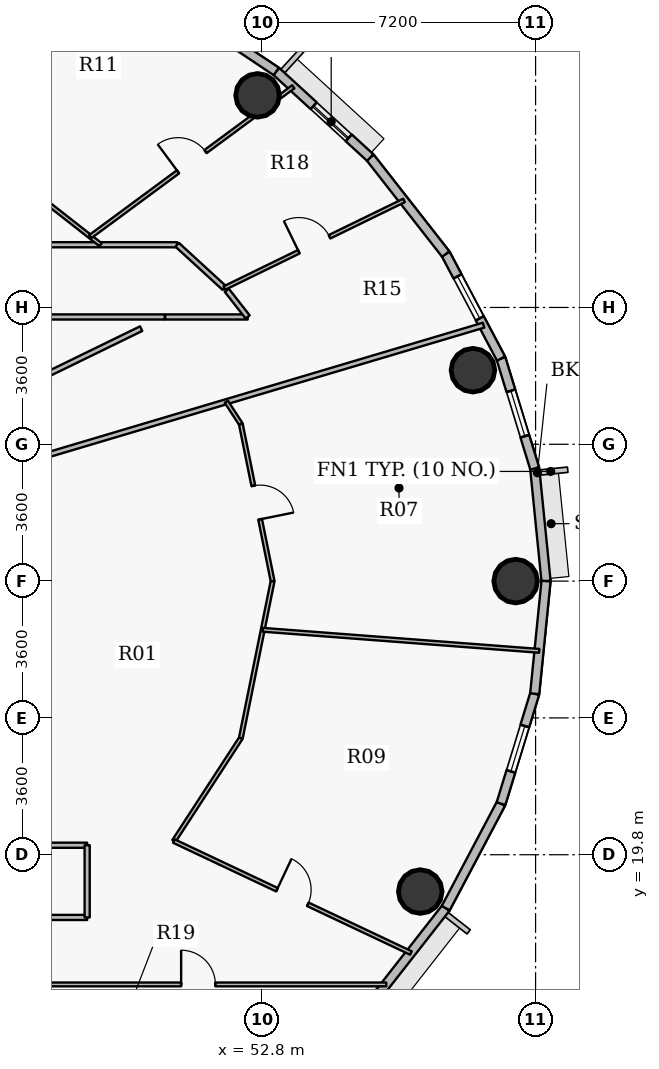
"""IFC4 building model, lengths in metres.
Left out: names, types, materials, properties, quantities, classifications, styles, units other than length and angle.
Written with IfcOpenShell. Run it as: python <this file> out.ifc"""

import sys

from ifc_helpers import new_model, si_unit, direction, frame, frame_2d, origin, origin_2d, place, context, subcontext, project, spatial, rectangle, hollow_circle, extrude, source, transform, mapped, element, fill, save


model = new_model("IFC4")
c1 = context("Model", 3, precision=1e-05, world=origin(), true_north=direction((0.0, 1.0)))
c2 = subcontext(c1, "Body", "Model", "MODEL_VIEW")
j1 = project(units=[si_unit("LENGTHUNIT", "METRE"), si_unit("PLANEANGLEUNIT", "RADIAN")], contexts=[c1])
p1 = place(None, origin())
s1 = spatial("IfcSite", under=j1, at=p1, CompositionType="ELEMENT")
p2 = place(p1, origin())
s2 = spatial("IfcBuilding", under=s1, at=p2, CompositionType="ELEMENT")
p3 = place(p2, frame((0.0, 0.0, 240.3)))
s3 = spatial("IfcBuildingStorey", under=s2, at=p3, CompositionType="ELEMENT", Elevation=240.3)
for number, where, z_axis, x_axis in (
    (1, (59.475, 27.0, 0.0), (0.0, 0.0, 1.0), (1.0, 0.0, 0.0)),
    (2, (58.351, 32.549, 0.0), (0.0, 0.0, 1.0), (1.0, 0.0, 0.0)),
    (3, (52.683, 39.781, 0.0), (0.0, 0.0, 1.0), (1.0, 0.0, 0.0)),
    (4, (56.965, 18.831, 0.0), (0.0, 0.0, 1.0), (1.0, 0.0, 0.0)),
):
    element("IfcColumn", number, at=place(p3, frame(where, z_axis=z_axis, x_axis=x_axis)), inside=s3, PredefinedType="COLUMN", context=c2, shape_type="SweptSolid", body=[
        extrude(hollow_circle(Radius=0.575, WallThickness=0.036, at=origin_2d()), origin(), (0.0, 0.0, 1.0), 3.75),
    ])
p4 = place(p3, frame((59.977, 29.964, 0.0), z_axis=(0.0, 0.0, 1.0), x_axis=(0.099990595253, -0.994988382274, 0.0)))
e5 = element("IfcWall", 5, at=p4, inside=s3, PredefinedType="SOLIDWALL", context=c2, shape_type="SweptSolid", body=[
    extrude(rectangle(XDim=2.979, YDim=0.24, at=frame_2d((1.489, 0.0))), origin(), (0.0, 0.0, 1.0), 3.5),
])
p5 = place(p3, frame((59.09, 32.856, 0.0), z_axis=(0.0, 0.0, 1.0), x_axis=(0.293132907334, -0.95607170162, 0.0)))
e6 = element("IfcWall", 6, at=p5, inside=s3, PredefinedType="SOLIDWALL", context=c2, shape_type="SweptSolid", body=[
    extrude(rectangle(XDim=3.025, YDim=0.24, at=frame_2d((1.512, 0.0))), origin(), (0.0, 0.0, 1.0), 3.5),
])
p6 = place(p5, frame((0.887, 0.0, 0.9)))
e7 = element("IfcOpeningElement", 7, at=p6, cuts=e6, PredefinedType="OPENING", context=c2, shape_type="SweptSolid", body=[
    extrude(rectangle(XDim=1.25, YDim=1.65, at=origin_2d()), frame((0.625, 0.13, 0.825), z_axis=(0.0, -1.0, 0.0), x_axis=(1.0, 0.0, 0.0)), (0.0, 0.0, 1.0), 0.26),
])
p7 = place(p3, frame((57.636, 35.605, 0.0), z_axis=(0.0, 0.0, 1.0), x_axis=(0.46766049993, -0.883908172157, 0.0)))
e8 = element("IfcWall", 8, at=p7, inside=s3, PredefinedType="SOLIDWALL", context=c2, shape_type="SweptSolid", body=[
    extrude(rectangle(XDim=3.11, YDim=0.24, at=frame_2d((1.555, 0.0))), origin(), (0.0, 0.0, 1.0), 3.5),
])
p8 = place(p7, frame((0.664, 0.0, 0.9)))
e9 = element("IfcOpeningElement", 9, at=p8, cuts=e8, PredefinedType="OPENING", context=c2, shape_type="SweptSolid", body=[
    extrude(rectangle(XDim=1.25, YDim=1.65, at=origin_2d()), frame((0.625, 0.13, 0.825), z_axis=(0.0, -1.0, 0.0), x_axis=(1.0, 0.0, 0.0)), (0.0, 0.0, 1.0), 0.26),
])
p9 = place(p3, frame((55.648, 38.145, 0.0), z_axis=(0.0, 0.0, 1.0), x_axis=(0.616312344705, -0.787501805562, 0.0)))
e10 = element("IfcWall", 10, at=p9, inside=s3, PredefinedType="SOLIDWALL", context=c2, shape_type="SweptSolid", body=[
    extrude(rectangle(XDim=3.225, YDim=0.24, at=frame_2d((1.612, 0.0))), origin(), (0.0, 0.0, 1.0), 3.5),
])
p10 = place(p3, frame((53.176, 40.411, 0.0), z_axis=(0.0, 0.0, 1.0), x_axis=(0.737123922599, -0.675757591694, 0.0)))
e11 = element("IfcWall", 11, at=p10, inside=s3, PredefinedType="SOLIDWALL", context=c2, shape_type="SweptSolid", body=[
    extrude(rectangle(XDim=3.354, YDim=0.24, at=frame_2d((1.677, 0.0))), origin(), (0.0, 0.0, 1.0), 3.5),
])
p11 = place(p10, frame((1.336, 0.0, 0.9)))
e12 = element("IfcOpeningElement", 12, at=p11, cuts=e11, PredefinedType="OPENING", context=c2, shape_type="SweptSolid", body=[
    extrude(rectangle(XDim=1.25, YDim=1.65, at=origin_2d()), frame((0.625, 0.13, 0.825), z_axis=(0.0, -1.0, 0.0), x_axis=(1.0, 0.0, 0.0)), (0.0, 0.0, 1.0), 0.26),
])
p12 = place(p3, frame((50.28, 42.348, 0.0), z_axis=(0.0, 0.0, 1.0), x_axis=(0.831262496074, -0.555880079352, 0.0)))
e13 = element("IfcWall", 13, at=p12, inside=s3, PredefinedType="SOLIDWALL", context=c2, shape_type="SweptSolid", body=[
    extrude(rectangle(XDim=3.484, YDim=0.24, at=frame_2d((1.742, 0.0))), origin(), (0.0, 0.0, 1.0), 3.5),
])
p13 = place(p3, frame((57.636, 18.395, 0.0), z_axis=(0.0, 0.0, 1.0), x_axis=(-0.616312344705, -0.787501805562, 0.0)))
e14 = element("IfcWall", 14, at=p13, inside=s3, PredefinedType="SOLIDWALL", context=c2, shape_type="SweptSolid", body=[
    extrude(rectangle(XDim=3.225, YDim=0.24, at=frame_2d((1.612, 0.0))), origin(), (0.0, 0.0, 1.0), 3.5),
])
p14 = place(p3, frame((59.09, 21.144, 0.0), z_axis=(0.0, 0.0, 1.0), x_axis=(-0.46766049993, -0.883908172157, 0.0)))
e15 = element("IfcWall", 15, at=p14, inside=s3, PredefinedType="SOLIDWALL", context=c2, shape_type="SweptSolid", body=[
    extrude(rectangle(XDim=3.11, YDim=0.24, at=frame_2d((1.555, 0.0))), origin(), (0.0, 0.0, 1.0), 3.5),
])
p15 = place(p3, frame((59.977, 24.036, 0.0), z_axis=(0.0, 0.0, 1.0), x_axis=(-0.293132907334, -0.95607170162, 0.0)))
e16 = element("IfcWall", 16, at=p15, inside=s3, PredefinedType="SOLIDWALL", context=c2, shape_type="SweptSolid", body=[
    extrude(rectangle(XDim=3.025, YDim=0.24, at=frame_2d((1.512, 0.0))), origin(), (0.0, 0.0, 1.0), 3.5),
])
p16 = place(p15, frame((0.887, 0.0, 0.9)))
e17 = element("IfcOpeningElement", 17, at=p16, cuts=e16, PredefinedType="OPENING", context=c2, shape_type="SweptSolid", body=[
    extrude(rectangle(XDim=1.25, YDim=1.65, at=origin_2d()), frame((0.625, 0.13, 0.825), z_axis=(0.0, -1.0, 0.0), x_axis=(1.0, 0.0, 0.0)), (0.0, 0.0, 1.0), 0.26),
])
p17 = place(p3, frame((60.275, 27.0, 0.0), z_axis=(0.0, 0.0, 1.0), x_axis=(-0.099990595253, -0.994988382274, 0.0)))
e18 = element("IfcWall", 18, at=p17, inside=s3, PredefinedType="SOLIDWALL", context=c2, shape_type="SweptSolid", body=[
    extrude(rectangle(XDim=2.979, YDim=0.24, at=frame_2d((1.489, 0.0))), origin(), (0.0, 0.0, 1.0), 3.5),
])
p18 = place(p3, frame((24.35, 18.15, 0.0), z_axis=(0.0, 0.0, 1.0), x_axis=(1.0, 0.0, 0.0)))
e19 = element("IfcWall", 19, at=p18, inside=s3, PredefinedType="PARTITIONING", context=c2, shape_type="SweptSolid", body=[
    extrude(rectangle(XDim=23.85, YDim=0.135, at=frame_2d((11.925, 0.0))), origin(), (0.0, 0.0, 1.0), 2.935),
])
p19 = place(p18, frame((14.838, 0.0, 0.0)))
e20 = element("IfcOpeningElement", 20, at=p19, cuts=e19, PredefinedType="OPENING", context=c2, shape_type="SweptSolid", body=[
    extrude(rectangle(XDim=1.0, YDim=2.15, at=origin_2d()), frame((0.5, 0.078, 1.075), z_axis=(0.0, -1.0, 0.0), x_axis=(1.0, 0.0, 0.0)), (0.0, 0.0, 1.0), 0.155),
])
p20 = place(p18, frame((21.472, 0.0, 0.0)))
e21 = element("IfcOpeningElement", 21, at=p20, cuts=e19, PredefinedType="OPENING", context=c2, shape_type="SweptSolid", body=[
    extrude(rectangle(XDim=1.0, YDim=2.15, at=origin_2d()), frame((0.5, 0.078, 1.075), z_axis=(0.0, -1.0, 0.0), x_axis=(1.0, 0.0, 0.0)), (0.0, 0.0, 1.0), 0.155),
])
p21 = place(p3, frame((24.35, 35.85, 0.0), z_axis=(0.0, 0.0, 1.0), x_axis=(1.0, 0.0, 0.0)))
e22 = element("IfcWall", 22, at=p21, inside=s3, PredefinedType="PARTITIONING", context=c2, shape_type="SweptSolid", body=[
    extrude(rectangle(XDim=26.218, YDim=0.135, at=frame_2d((13.109, 0.0))), origin(), (0.0, 0.0, 1.0), 2.935),
])
p22 = place(p21, frame((3.172, 0.0, 0.0)))
e23 = element("IfcOpeningElement", 23, at=p22, cuts=e22, PredefinedType="OPENING", context=c2, shape_type="SweptSolid", body=[
    extrude(rectangle(XDim=1.0, YDim=2.15, at=origin_2d()), frame((0.5, 0.078, 1.075), z_axis=(0.0, -1.0, 0.0), x_axis=(1.0, 0.0, 0.0)), (0.0, 0.0, 1.0), 0.155),
])
p23 = place(p21, frame((18.306, 0.0, 0.0)))
e24 = element("IfcOpeningElement", 24, at=p23, cuts=e22, PredefinedType="OPENING", context=c2, shape_type="SweptSolid", body=[
    extrude(rectangle(XDim=1.0, YDim=2.15, at=origin_2d()), frame((0.5, 0.078, 1.075), z_axis=(0.0, -1.0, 0.0), x_axis=(1.0, 0.0, 0.0)), (0.0, 0.0, 1.0), 0.155),
])
p24 = place(p3, frame((45.8, 20.05, 0.0), z_axis=(0.0, 0.0, 1.0), x_axis=(1.0, 0.0, 0.0)))
e25 = element("IfcWall", 25, at=p24, inside=s3, PredefinedType="PARTITIONING", context=c2, shape_type="SweptSolid", body=[
    extrude(rectangle(XDim=2.4, YDim=0.135, at=frame_2d((1.2, 0.0))), origin(), (0.0, 0.0, 1.0), 3.5),
])
p25 = place(p3, frame((45.97, 29.967, 0.0), z_axis=(0.0, 0.0, 1.0), x_axis=(0.958474934199, 0.285176788174, 0.0)))
e26 = element("IfcWall", 26, at=p25, inside=s3, PredefinedType="PARTITIONING", context=c2, shape_type="SweptSolid", body=[
    extrude(rectangle(XDim=13.21, YDim=0.135, at=frame_2d((6.605, 0.0))), origin(), (0.0, 0.0, 1.0), 2.985),
])
p26 = place(p3, frame((46.039, 37.819, 0.0), z_axis=(0.0, 0.0, 1.0), x_axis=(0.787364681479, -0.616487516791, 0.0)))
e27 = element("IfcWall", 27, at=p26, inside=s3, PredefinedType="PARTITIONING", context=c2, shape_type="SweptSolid", body=[
    extrude(rectangle(XDim=3.195, YDim=0.1, at=frame_2d((1.597, 0.0))), origin(), (0.0, 0.0, 1.0), 2.935),
])
p27 = place(p3, frame((46.175, 16.387, 0.0), z_axis=(0.0, 0.0, 1.0), x_axis=(1.0, 0.0, 0.0)))
e28 = element("IfcWall", 28, at=p27, inside=s3, PredefinedType="PARTITIONING", context=c2, shape_type="SweptSolid", body=[
    extrude(rectangle(XDim=9.896, YDim=0.1, at=frame_2d((4.948, 0.0))), origin(), (0.0, 0.0, 1.0), 2.935),
])
p28 = place(p27, frame((4.498, 0.0, 0.0)))
e29 = element("IfcOpeningElement", 29, at=p28, cuts=e28, PredefinedType="OPENING", context=c2, shape_type="SweptSolid", body=[
    extrude(rectangle(XDim=0.9, YDim=2.1, at=origin_2d()), frame((0.45, 0.06, 1.05), z_axis=(0.0, -1.0, 0.0), x_axis=(1.0, 0.0, 0.0)), (0.0, 0.0, 1.0), 0.12),
])
p29 = place(p3, frame((46.23, 16.33, 0.0), z_axis=(0.0, 0.0, 1.0), x_axis=(0.69206255942, -0.721837525935, 0.0)))
e30 = element("IfcWall", 30, at=p29, inside=s3, PredefinedType="PARTITIONING", context=c2, shape_type="SweptSolid", body=[
    extrude(rectangle(XDim=6.24, YDim=0.135, at=frame_2d((3.12, 0.0))), origin(), (0.0, 0.0, 1.0), 2.985),
])
p30 = place(p3, frame((48.2, 18.15, 0.0), z_axis=(0.0, 0.0, 1.0), x_axis=(0.0, 1.0, 0.0)))
e31 = element("IfcWall", 31, at=p30, inside=s3, PredefinedType="PARTITIONING", context=c2, shape_type="SweptSolid", body=[
    extrude(rectangle(XDim=1.9, YDim=0.135, at=frame_2d((0.95, 0.0))), origin(), (0.0, 0.0, 1.0), 3.5),
])
p31 = place(p3, frame((48.281, 36.064, 0.0), z_axis=(0.0, 0.0, 1.0), x_axis=(0.804612975085, 0.593799596097, 0.0)))
e32 = element("IfcWall", 32, at=p31, inside=s3, PredefinedType="PARTITIONING", context=c2, shape_type="SweptSolid", body=[
    extrude(rectangle(XDim=6.64, YDim=0.1, at=frame_2d((3.32, 0.0))), origin(), (0.0, 0.0, 1.0), 2.985),
])
p32 = place(p31, frame((2.87, 0.0, 0.0)))
e33 = element("IfcOpeningElement", 33, at=p32, cuts=e32, PredefinedType="OPENING", context=c2, shape_type="SweptSolid", body=[
    extrude(rectangle(XDim=0.9, YDim=2.1, at=origin_2d()), frame((0.45, 0.06, 1.05), z_axis=(0.0, -1.0, 0.0), x_axis=(1.0, 0.0, 0.0)), (0.0, 0.0, 1.0), 0.12),
])
p33 = place(p3, frame((50.251, 33.95, 0.0), z_axis=(0.0, 0.0, 1.0), x_axis=(1.0, 0.0, 0.0)))
e34 = element("IfcWall", 34, at=p33, inside=s3, PredefinedType="PARTITIONING", context=c2, shape_type="SweptSolid", body=[
    extrude(rectangle(XDim=2.172, YDim=0.135, at=frame_2d((1.086, 0.0))), origin(), (0.0, 0.0, 1.0), 3.5),
])
p34 = place(p3, frame((50.482, 20.16, 0.0), z_axis=(0.0, 0.0, 1.0), x_axis=(0.545421330779, 0.838162020096, 0.0)))
e35 = element("IfcWall", 35, at=p34, inside=s3, PredefinedType="PARTITIONING", context=c2, shape_type="SweptSolid", body=[
    extrude(rectangle(XDim=3.23, YDim=0.1, at=frame_2d((1.615, 0.0))), origin(), (0.0, 0.0, 1.0), 2.935),
])
p35 = place(p3, frame((50.482, 20.16, 0.0), z_axis=(0.0, 0.0, 1.0), x_axis=(0.904207257568, -0.42709394208, 0.0)))
e36 = element("IfcWall", 36, at=p35, inside=s3, PredefinedType="PARTITIONING", context=c2, shape_type="SweptSolid", body=[
    extrude(rectangle(XDim=6.897, YDim=0.1, at=frame_2d((3.448, 0.0))), origin(), (0.0, 0.0, 1.0), 2.985),
])
p36 = place(p35, frame((2.998, 0.0, 0.0)))
e37 = element("IfcOpeningElement", 37, at=p36, cuts=e36, PredefinedType="OPENING", context=c2, shape_type="SweptSolid", body=[
    extrude(rectangle(XDim=0.9, YDim=2.1, at=origin_2d()), frame((0.45, 0.06, 1.05), z_axis=(0.0, -1.0, 0.0), x_axis=(1.0, 0.0, 0.0)), (0.0, 0.0, 1.0), 0.12),
])
p37 = place(p3, frame((50.568, 35.85, 0.0), z_axis=(0.0, 0.0, 1.0), x_axis=(0.737130103714, -0.675750849202, 0.0)))
e38 = element("IfcWall", 38, at=p37, inside=s3, PredefinedType="PARTITIONING", context=c2, shape_type="SweptSolid", body=[
    extrude(rectangle(XDim=1.687, YDim=0.135, at=frame_2d((0.843, 0.0))), origin(), (0.0, 0.0, 1.0), 3.5),
])
p38 = place(p3, frame((51.811, 34.71, 0.0), z_axis=(0.0, 0.0, 1.0), x_axis=(0.89880279574, 0.438353207322, 0.0)))
e39 = element("IfcWall", 39, at=p38, inside=s3, PredefinedType="PARTITIONING", context=c2, shape_type="SweptSolid", body=[
    extrude(rectangle(XDim=5.259, YDim=0.1, at=frame_2d((2.63, 0.0))), origin(), (0.0, 0.0, 1.0), 2.985),
])
p39 = place(p38, frame((2.18, 0.0, 0.0)))
e40 = element("IfcOpeningElement", 40, at=p39, cuts=e39, PredefinedType="OPENING", context=c2, shape_type="SweptSolid", body=[
    extrude(rectangle(XDim=0.9, YDim=2.1, at=origin_2d()), frame((0.45, 0.06, 1.05), z_axis=(0.0, -1.0, 0.0), x_axis=(1.0, 0.0, 0.0)), (0.0, 0.0, 1.0), 0.12),
])
p40 = place(p3, frame((51.862, 31.719, 0.0), z_axis=(0.0, 0.0, 1.0), x_axis=(0.545576382868, -0.838061101863, 0.0)))
e41 = element("IfcWall", 41, at=p40, inside=s3, PredefinedType="PARTITIONING", context=c2, shape_type="SweptSolid", body=[
    extrude(rectangle(XDim=0.7, YDim=0.1, at=frame_2d((0.35, 0.0))), origin(), (0.0, 0.0, 1.0), 2.935),
])
p41 = place(p3, frame((51.874, 34.653, 0.0), z_axis=(0.0, 0.0, 1.0), x_axis=(0.61628613448, -0.787522317429, 0.0)))
e42 = element("IfcWall", 42, at=p41, inside=s3, PredefinedType="PARTITIONING", context=c2, shape_type="SweptSolid", body=[
    extrude(rectangle(XDim=0.893, YDim=0.135, at=frame_2d((0.446, 0.0))), origin(), (0.0, 0.0, 1.0), 3.5),
])
p42 = place(p3, frame((52.244, 22.867, 0.0), z_axis=(0.0, 0.0, 1.0), x_axis=(0.198276062883, 0.980146215056, 0.0)))
e43 = element("IfcWall", 43, at=p42, inside=s3, PredefinedType="PARTITIONING", context=c2, shape_type="SweptSolid", body=[
    extrude(rectangle(XDim=4.216, YDim=0.1, at=frame_2d((2.108, 0.0))), origin(), (0.0, 0.0, 1.0), 2.935),
])
p43 = place(p3, frame((52.244, 31.133, 0.0), z_axis=(0.0, 0.0, 1.0), x_axis=(0.198264809747, -0.980148491411, 0.0)))
e44 = element("IfcWall", 44, at=p43, inside=s3, PredefinedType="PARTITIONING", context=c2, shape_type="SweptSolid", body=[
    extrude(rectangle(XDim=4.216, YDim=0.1, at=frame_2d((2.108, 0.0))), origin(), (0.0, 0.0, 1.0), 2.935),
])
p44 = place(p43, frame((1.658, 0.0, 0.0)))
e45 = element("IfcOpeningElement", 45, at=p44, cuts=e44, PredefinedType="OPENING", context=c2, shape_type="SweptSolid", body=[
    extrude(rectangle(XDim=0.9, YDim=2.1, at=origin_2d()), frame((0.45, 0.06, 1.05), z_axis=(0.0, -1.0, 0.0), x_axis=(1.0, 0.0, 0.0)), (0.0, 0.0, 1.0), 0.12),
])
p45 = place(p3, frame((52.821, 25.719, 0.0), z_axis=(0.0, 0.0, 1.0), x_axis=(0.997110709209, -0.075962053559, 0.0)))
e46 = element("IfcWall", 46, at=p45, inside=s3, PredefinedType="PARTITIONING", context=c2, shape_type="SweptSolid", body=[
    extrude(rectangle(XDim=7.296, YDim=0.1, at=frame_2d((3.648, 0.0))), origin(), (0.0, 0.0, 1.0), 2.985),
])
p46 = place(p3, frame((50.241, 33.95, 0.0), z_axis=(0.0, 0.0, 1.0), x_axis=(-1.0, 0.0, 0.0)))
e47 = element("IfcWall", 47, at=p46, inside=s3, PredefinedType="PARTITIONING", context=c2, shape_type="SweptSolid", body=[
    extrude(rectangle(XDim=4.441, YDim=0.135, at=frame_2d((2.221, 0.0))), origin(), (0.0, 0.0, 1.0), 3.5),
])
p47 = place(p3, frame((46.06, 31.906, 0.0), z_axis=(0.0, 0.0, 1.0), x_axis=(0.898819963923, 0.438318003797, 0.0)))
e48 = element("IfcWall", 48, at=p47, inside=s3, PredefinedType="PARTITIONING", context=c2, shape_type="SweptSolid", body=[
    extrude(rectangle(XDim=3.962, YDim=0.135, at=frame_2d((1.981, 0.0))), origin(), (0.0, 0.0, 1.0), 3.5),
])
m1 = source(origin(), c2, "Body", "SweptSolid", [
    extrude(rectangle(XDim=1.25, YDim=1.65, at=origin_2d()), frame((0.625, 0.03, 0.825), z_axis=(0.0, -1.0, 0.0), x_axis=(1.0, 0.0, 0.0)), (0.0, 0.0, 1.0), 0.06),
])
p48 = place(p11, origin())
e49 = element("IfcWindow", 49, at=p48, inside=s3, PartitioningType="SINGLE_PANEL", PredefinedType="WINDOW", context=c2, shape_type="MappedRepresentation", body=[
    mapped(m1, transform((0.0, 0.0, 0.0), x_axis=(1.0, 0.0, 0.0), y_axis=(0.0, 1.0, 0.0), z_axis=(0.0, 0.0, 1.0), scale=1.0)),
])
fill(e12, e49)
p49 = place(p16, origin())
e50 = element("IfcWindow", 50, at=p49, inside=s3, PartitioningType="SINGLE_PANEL", PredefinedType="WINDOW", context=c2, shape_type="MappedRepresentation", body=[
    mapped(m1, transform((0.0, 0.0, 0.0), x_axis=(1.0, 0.0, 0.0), y_axis=(0.0, 1.0, 0.0), z_axis=(0.0, 0.0, 1.0), scale=1.0)),
])
fill(e17, e50)
p50 = place(p6, origin())
e51 = element("IfcWindow", 51, at=p50, inside=s3, PartitioningType="SINGLE_PANEL", PredefinedType="WINDOW", context=c2, shape_type="MappedRepresentation", body=[
    mapped(m1, transform((0.0, 0.0, 0.0), x_axis=(1.0, 0.0, 0.0), y_axis=(0.0, 1.0, 0.0), z_axis=(0.0, 0.0, 1.0), scale=1.0)),
])
fill(e7, e51)
p51 = place(p8, origin())
e52 = element("IfcWindow", 52, at=p51, inside=s3, PartitioningType="SINGLE_PANEL", PredefinedType="WINDOW", context=c2, shape_type="MappedRepresentation", body=[
    mapped(m1, transform((0.0, 0.0, 0.0), x_axis=(1.0, 0.0, 0.0), y_axis=(0.0, 1.0, 0.0), z_axis=(0.0, 0.0, 1.0), scale=1.0)),
])
fill(e9, e52)
m2 = source(origin(), c2, "Body", "SweptSolid", [
    extrude(rectangle(XDim=0.9, YDim=2.1, at=origin_2d()), frame((0.45, 0.025, 1.05), z_axis=(0.0, -1.0, 0.0), x_axis=(1.0, 0.0, 0.0)), (0.0, 0.0, 1.0), 0.05),
])
p52 = place(p36, origin())
e53 = element("IfcDoor", 53, at=p52, inside=s3, OperationType="SINGLE_SWING_LEFT", PredefinedType="DOOR", context=c2, shape_type="MappedRepresentation", body=[
    mapped(m2, transform((0.0, 0.0, 0.0), x_axis=(1.0, 0.0, 0.0), y_axis=(0.0, 1.0, 0.0), z_axis=(0.0, 0.0, 1.0), scale=1.0)),
])
fill(e37, e53)
p53 = place(p44, origin())
e54 = element("IfcDoor", 54, at=p53, inside=s3, OperationType="SINGLE_SWING_RIGHT", PredefinedType="DOOR", context=c2, shape_type="MappedRepresentation", body=[
    mapped(m2, transform((0.0, 0.0, 0.0), x_axis=(1.0, 0.0, 0.0), y_axis=(0.0, 1.0, 0.0), z_axis=(0.0, 0.0, 1.0), scale=1.0)),
])
fill(e45, e54)
p54 = place(p28, origin())
e55 = element("IfcDoor", 55, at=p54, inside=s3, OperationType="SINGLE_SWING_LEFT", PredefinedType="DOOR", context=c2, shape_type="MappedRepresentation", body=[
    mapped(m2, transform((0.0, 0.0, 0.0), x_axis=(1.0, 0.0, 0.0), y_axis=(0.0, 1.0, 0.0), z_axis=(0.0, 0.0, 1.0), scale=1.0)),
])
fill(e29, e55)
p55 = place(p32, origin())
e56 = element("IfcDoor", 56, at=p55, inside=s3, OperationType="SINGLE_SWING_LEFT", PredefinedType="DOOR", context=c2, shape_type="MappedRepresentation", body=[
    mapped(m2, transform((0.0, 0.0, 0.0), x_axis=(1.0, 0.0, 0.0), y_axis=(0.0, 1.0, 0.0), z_axis=(0.0, 0.0, 1.0), scale=1.0)),
])
fill(e33, e56)
p56 = place(p39, origin())
e57 = element("IfcDoor", 57, at=p56, inside=s3, OperationType="SINGLE_SWING_LEFT", PredefinedType="DOOR", context=c2, shape_type="MappedRepresentation", body=[
    mapped(m2, transform((0.0, 0.0, 0.0), x_axis=(1.0, 0.0, 0.0), y_axis=(0.0, 1.0, 0.0), z_axis=(0.0, 0.0, 1.0), scale=1.0)),
])
fill(e40, e57)
save(model, sys.argv[1])
